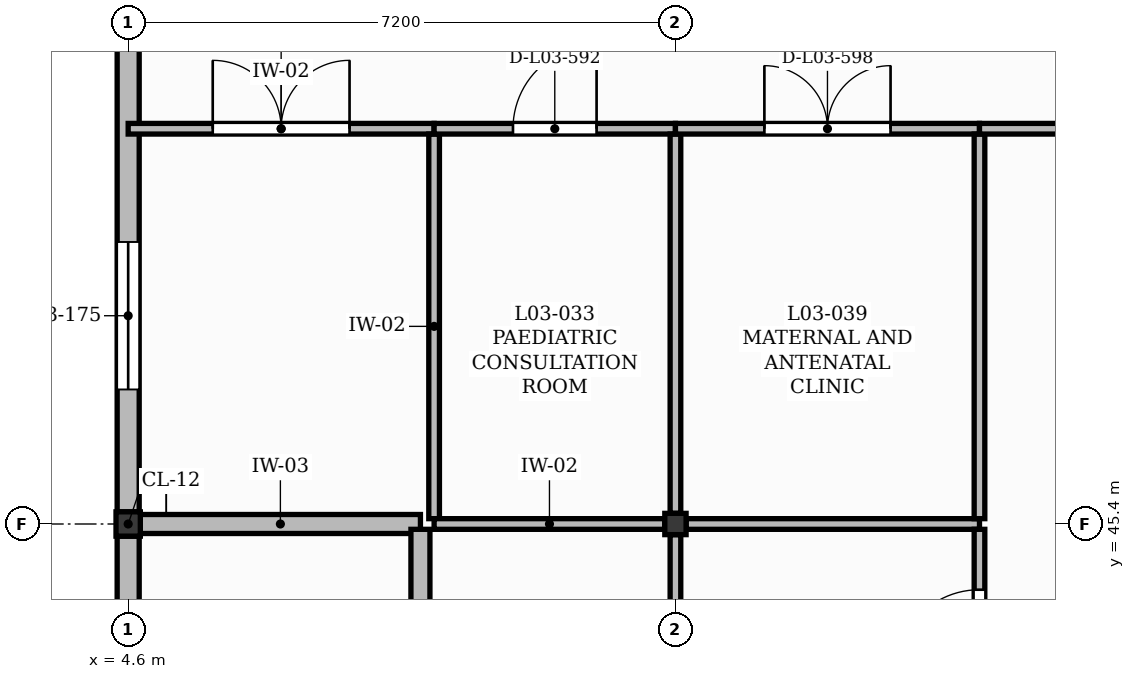
"""IFC4 building model, lengths in metres.
Left out: names, types, materials, properties, quantities, classifications, styles, units other than length and angle.
Written with IfcOpenShell. Run it as: python <this file> out.ifc"""

import sys

from ifc_helpers import new_model, si_unit, direction, frame, frame_2d, origin, origin_2d, place, context, subcontext, project, spatial, rectangle, extrude, element, fill, save


model = new_model("IFC4")
c1 = context("Model", 3, precision=1e-05, world=origin(), true_north=direction((0.0, 1.0)))
c2 = subcontext(c1, "Body", "Model", "MODEL_VIEW")
j1 = project(units=[si_unit("LENGTHUNIT", "METRE"), si_unit("PLANEANGLEUNIT", "RADIAN")], contexts=[c1])
p1 = place(None, origin())
s1 = spatial("IfcSite", under=j1, at=p1, CompositionType="ELEMENT")
p2 = place(p1, origin())
s2 = spatial("IfcBuilding", under=s1, at=p2, CompositionType="ELEMENT")
p3 = place(p2, frame((0.0, 0.0, 13.2)))
s3 = spatial("IfcBuildingStorey", under=s2, at=p3, CompositionType="ELEMENT", Elevation=13.2)
p4 = place(p3, frame((4.6, 45.4, 0.0), z_axis=(0.0, 0.0, 1.0), x_axis=(1.0, 0.0, 0.0)))
e1 = element("IfcColumn", 1, at=p4, inside=s3, PredefinedType="COLUMN", context=c2, shape_type="SweptSolid", body=[
    extrude(rectangle(XDim=0.32, YDim=0.32, at=origin_2d()), origin(), (0.0, 0.0, 1.0), 3.98),
])
p5 = place(p3, frame((11.8, 45.4, 0.0), z_axis=(0.0, 0.0, 1.0), x_axis=(1.0, 0.0, 0.0)))
e2 = element("IfcColumn", 2, at=p5, inside=s3, PredefinedType="COLUMN", context=c2, shape_type="SweptSolid", body=[
    extrude(rectangle(XDim=0.28, YDim=0.28, at=origin_2d()), origin(), (0.0, 0.0, 1.0), 3.98),
])
p6 = place(p3, frame((4.6, 36.94, 0.0), z_axis=(0.0, 0.0, 1.0), x_axis=(0.0, 1.0, 0.0)))
e3 = element("IfcWall", 3, at=p6, inside=s3, PredefinedType="SOLIDWALL", context=c2, shape_type="SweptSolid", body=[
    extrude(rectangle(XDim=8.3, YDim=0.29, at=frame_2d((4.15, 0.0))), origin(), (0.0, 0.0, 1.0), 3.49),
])
p7 = place(p6, frame((2.845, 0.0, 1.0)))
e4 = element("IfcOpeningElement", 4, at=p7, cuts=e3, PredefinedType="OPENING", context=c2, shape_type="SweptSolid", body=[
    extrude(rectangle(XDim=1.66, YDim=1.8, at=frame_2d((0.83, 0.9))), frame((0.0, 0.155, 0.0), z_axis=(0.0, -1.0, 0.0), x_axis=(1.0, 0.0, 0.0)), (0.0, 0.0, 1.0), 0.31),
])
p8 = place(p6, frame((5.185, 0.0, 1.0)))
e5 = element("IfcOpeningElement", 5, at=p8, cuts=e3, PredefinedType="OPENING", context=c2, shape_type="SweptSolid", body=[
    extrude(rectangle(XDim=1.66, YDim=1.8, at=frame_2d((0.83, 0.9))), frame((0.0, 0.155, 0.0), z_axis=(0.0, -1.0, 0.0), x_axis=(1.0, 0.0, 0.0)), (0.0, 0.0, 1.0), 0.31),
])
p9 = place(p3, frame((4.6, 45.56, 0.0), z_axis=(0.0, 0.0, 1.0), x_axis=(0.0, 1.0, 0.0)))
e6 = element("IfcWall", 6, at=p9, inside=s3, PredefinedType="SOLIDWALL", context=c2, shape_type="SweptSolid", body=[
    extrude(rectangle(XDim=6.9, YDim=0.29, at=frame_2d((3.45, 0.0))), origin(), (0.0, 0.0, 1.0), 3.52),
])
p10 = place(p9, frame((1.61, 0.0, 1.0)))
e7 = element("IfcOpeningElement", 7, at=p10, cuts=e6, PredefinedType="OPENING", context=c2, shape_type="SweptSolid", body=[
    extrude(rectangle(XDim=1.94, YDim=1.8, at=frame_2d((0.97, 0.9))), frame((0.0, 0.155, 0.0), z_axis=(0.0, -1.0, 0.0), x_axis=(1.0, 0.0, 0.0)), (0.0, 0.0, 1.0), 0.31),
])
p11 = place(p3, frame((4.76, 45.4, 0.0), z_axis=(0.0, 0.0, 1.0), x_axis=(1.0, 0.0, 0.0)))
e8 = element("IfcWall", 8, at=p11, inside=s3, PredefinedType="SOLIDWALL", context=c2, shape_type="SweptSolid", body=[
    extrude(rectangle(XDim=3.685, YDim=0.25, at=frame_2d((1.843, 0.0))), origin(), (0.0, 0.0, 1.0), 3.52),
])
p12 = place(p3, frame((4.6, 50.6, 0.0), z_axis=(0.0, 0.0, 1.0), x_axis=(1.0, 0.0, 0.0)))
e9 = element("IfcWall", 9, at=p12, inside=s3, PredefinedType="PARTITIONING", context=c2, shape_type="SweptSolid", body=[
    extrude(rectangle(XDim=4.025, YDim=0.14, at=frame_2d((2.012, 0.0))), origin(), (0.0, 0.0, 1.0), 3.93),
])
p13 = place(p12, frame((1.113, 0.0, 0.0)))
e10 = element("IfcOpeningElement", 10, at=p13, cuts=e9, PredefinedType="OPENING", context=c2, shape_type="SweptSolid", body=[
    extrude(rectangle(XDim=1.8, YDim=2.3, at=frame_2d((0.9, 1.15))), frame((0.0, 0.08, 0.0), z_axis=(0.0, -1.0, 0.0), x_axis=(1.0, 0.0, 0.0)), (0.0, 0.0, 1.0), 0.16),
])
p14 = place(p3, frame((8.445, 38.52, 0.0), z_axis=(0.0, 0.0, 1.0), x_axis=(0.0, 1.0, 0.0)))
e11 = element("IfcWall", 11, at=p14, inside=s3, PredefinedType="SOLIDWALL", context=c2, shape_type="SweptSolid", body=[
    extrude(rectangle(XDim=6.81, YDim=0.25, at=frame_2d((3.405, 0.0))), origin(), (0.0, 0.0, 1.0), 3.93),
])
p15 = place(p3, frame((8.625, 45.47, 0.0), z_axis=(0.0, 0.0, 1.0), x_axis=(0.0, 1.0, 0.0)))
e12 = element("IfcWall", 12, at=p15, inside=s3, PredefinedType="PARTITIONING", context=c2, shape_type="SweptSolid", body=[
    extrude(rectangle(XDim=5.06, YDim=0.14, at=frame_2d((2.53, 0.0))), origin(), (0.0, 0.0, 1.0), 3.93),
])
p16 = place(p3, frame((8.625, 45.4, 0.0), z_axis=(0.0, 0.0, 1.0), x_axis=(1.0, 0.0, 0.0)))
e13 = element("IfcWall", 13, at=p16, inside=s3, PredefinedType="PARTITIONING", context=c2, shape_type="SweptSolid", body=[
    extrude(rectangle(XDim=3.035, YDim=0.14, at=frame_2d((1.518, 0.0))), origin(), (0.0, 0.0, 1.0), 3.52),
])
p17 = place(p3, frame((8.625, 50.6, 0.0), z_axis=(0.0, 0.0, 1.0), x_axis=(1.0, 0.0, 0.0)))
e14 = element("IfcWall", 14, at=p17, inside=s3, PredefinedType="PARTITIONING", context=c2, shape_type="SweptSolid", body=[
    extrude(rectangle(XDim=3.175, YDim=0.14, at=frame_2d((1.587, 0.0))), origin(), (0.0, 0.0, 1.0), 3.93),
])
p18 = place(p17, frame((1.038, 0.0, 0.0)))
e15 = element("IfcOpeningElement", 15, at=p18, cuts=e14, PredefinedType="OPENING", context=c2, shape_type="SweptSolid", body=[
    extrude(rectangle(XDim=1.1, YDim=2.1, at=frame_2d((0.55, 1.05))), frame((0.0, 0.08, 0.0), z_axis=(0.0, -1.0, 0.0), x_axis=(1.0, 0.0, 0.0)), (0.0, 0.0, 1.0), 0.16),
])
p19 = place(p3, frame((11.8, 42.641, 0.0), z_axis=(0.0, 0.0, 1.0), x_axis=(0.0, 1.0, 0.0)))
e16 = element("IfcWall", 16, at=p19, inside=s3, PredefinedType="PARTITIONING", context=c2, shape_type="SweptSolid", body=[
    extrude(rectangle(XDim=2.619, YDim=0.14, at=frame_2d((1.31, 0.0))), origin(), (0.0, 0.0, 1.0), 3.49),
])
p20 = place(p3, frame((11.8, 45.54, 0.0), z_axis=(0.0, 0.0, 1.0), x_axis=(0.0, 1.0, 0.0)))
e17 = element("IfcWall", 17, at=p20, inside=s3, PredefinedType="PARTITIONING", context=c2, shape_type="SweptSolid", body=[
    extrude(rectangle(XDim=4.99, YDim=0.14, at=frame_2d((2.495, 0.0))), origin(), (0.0, 0.0, 1.0), 3.46),
])
p21 = place(p3, frame((11.94, 45.4, 0.0), z_axis=(0.0, 0.0, 1.0), x_axis=(1.0, 0.0, 0.0)))
e18 = element("IfcWall", 18, at=p21, inside=s3, PredefinedType="PARTITIONING", context=c2, shape_type="SweptSolid", body=[
    extrude(rectangle(XDim=3.86, YDim=0.14, at=frame_2d((1.93, 0.0))), origin(), (0.0, 0.0, 1.0), 3.52),
])
p22 = place(p3, frame((11.8, 50.6, 0.0), z_axis=(0.0, 0.0, 1.0), x_axis=(1.0, 0.0, 0.0)))
e19 = element("IfcWall", 19, at=p22, inside=s3, PredefinedType="PARTITIONING", context=c2, shape_type="SweptSolid", body=[
    extrude(rectangle(XDim=4.0, YDim=0.14, at=frame_2d((2.0, 0.0))), origin(), (0.0, 0.0, 1.0), 3.93),
])
p23 = place(p22, frame((1.17, 0.0, 0.0)))
e20 = element("IfcOpeningElement", 20, at=p23, cuts=e19, PredefinedType="OPENING", context=c2, shape_type="SweptSolid", body=[
    extrude(rectangle(XDim=1.66, YDim=2.3, at=frame_2d((0.83, 1.15))), frame((0.0, 0.08, 0.0), z_axis=(0.0, -1.0, 0.0), x_axis=(1.0, 0.0, 0.0)), (0.0, 0.0, 1.0), 0.16),
])
p24 = place(p3, frame((15.8, 42.641, 0.0), z_axis=(0.0, 0.0, 1.0), x_axis=(0.0, 1.0, 0.0)))
e21 = element("IfcWall", 21, at=p24, inside=s3, PredefinedType="PARTITIONING", context=c2, shape_type="SweptSolid", body=[
    extrude(rectangle(XDim=2.689, YDim=0.14, at=frame_2d((1.344, 0.0))), origin(), (0.0, 0.0, 1.0), 3.93),
])
p25 = place(p24, frame((0.794, 0.0, 0.0)))
e22 = element("IfcOpeningElement", 22, at=p25, cuts=e21, PredefinedType="OPENING", context=c2, shape_type="SweptSolid", body=[
    extrude(rectangle(XDim=1.1, YDim=2.1, at=frame_2d((0.55, 1.05))), frame((0.0, 0.08, 0.0), z_axis=(0.0, -1.0, 0.0), x_axis=(1.0, 0.0, 0.0)), (0.0, 0.0, 1.0), 0.16),
])
p26 = place(p3, frame((15.8, 45.47, 0.0), z_axis=(0.0, 0.0, 1.0), x_axis=(0.0, 1.0, 0.0)))
e23 = element("IfcWall", 23, at=p26, inside=s3, PredefinedType="PARTITIONING", context=c2, shape_type="SweptSolid", body=[
    extrude(rectangle(XDim=5.06, YDim=0.14, at=frame_2d((2.53, 0.0))), origin(), (0.0, 0.0, 1.0), 3.93),
])
p27 = place(p3, frame((15.8, 50.6, 0.0), z_axis=(0.0, 0.0, 1.0), x_axis=(1.0, 0.0, 0.0)))
e24 = element("IfcWall", 24, at=p27, inside=s3, PredefinedType="PARTITIONING", context=c2, shape_type="SweptSolid", body=[
    extrude(rectangle(XDim=3.2, YDim=0.14, at=frame_2d((1.6, 0.0))), origin(), (0.0, 0.0, 1.0), 3.93),
])
p28 = place(p27, frame((1.08, 0.0, 0.0)))
e25 = element("IfcOpeningElement", 25, at=p28, cuts=e24, PredefinedType="OPENING", context=c2, shape_type="SweptSolid", body=[
    extrude(rectangle(XDim=1.04, YDim=2.1, at=frame_2d((0.52, 1.05))), frame((0.0, 0.08, 0.0), z_axis=(0.0, -1.0, 0.0), x_axis=(1.0, 0.0, 0.0)), (0.0, 0.0, 1.0), 0.16),
])
p29 = place(p10, origin())
e26 = element("IfcWindow", 26, at=p29, inside=s3, PartitioningType="DOUBLE_PANEL_VERTICAL", PredefinedType="WINDOW", context=c2, shape_type="SweptSolid", body=[
    extrude(rectangle(XDim=1.94, YDim=1.8, at=frame_2d((0.97, 0.9))), frame((0.0, 0.03, 0.0), z_axis=(0.0, -1.0, 0.0), x_axis=(1.0, 0.0, 0.0)), (0.0, 0.0, 1.0), 0.06),
])
fill(e7, e26)
p30 = place(p13, origin())
e27 = element("IfcDoor", 27, at=p30, inside=s3, OperationType="DOUBLE_DOOR_SINGLE_SWING", PredefinedType="DOOR", context=c2, shape_type="SweptSolid", body=[
    extrude(rectangle(XDim=1.8, YDim=2.3, at=frame_2d((0.9, 1.15))), frame((0.0, 0.025, 0.0), z_axis=(0.0, -1.0, 0.0), x_axis=(1.0, 0.0, 0.0)), (0.0, 0.0, 1.0), 0.05),
])
fill(e10, e27)
p31 = place(p18, origin())
e28 = element("IfcDoor", 28, at=p31, inside=s3, OperationType="SINGLE_SWING_RIGHT", PredefinedType="DOOR", context=c2, shape_type="SweptSolid", body=[
    extrude(rectangle(XDim=1.1, YDim=2.1, at=frame_2d((0.55, 1.05))), frame((0.0, 0.025, 0.0), z_axis=(0.0, -1.0, 0.0), x_axis=(1.0, 0.0, 0.0)), (0.0, 0.0, 1.0), 0.05),
])
fill(e15, e28)
p32 = place(p25, origin())
e29 = element("IfcDoor", 29, at=p32, inside=s3, OperationType="SINGLE_SWING_LEFT", PredefinedType="DOOR", context=c2, shape_type="SweptSolid", body=[
    extrude(rectangle(XDim=1.1, YDim=2.1, at=frame_2d((0.55, 1.05))), frame((0.0, 0.025, 0.0), z_axis=(0.0, -1.0, 0.0), x_axis=(1.0, 0.0, 0.0)), (0.0, 0.0, 1.0), 0.05),
])
fill(e22, e29)
p33 = place(p23, origin())
e30 = element("IfcDoor", 30, at=p33, inside=s3, OperationType="DOUBLE_DOOR_SINGLE_SWING", PredefinedType="DOOR", context=c2, shape_type="SweptSolid", body=[
    extrude(rectangle(XDim=1.66, YDim=2.3, at=frame_2d((0.83, 1.15))), frame((0.0, 0.025, 0.0), z_axis=(0.0, -1.0, 0.0), x_axis=(1.0, 0.0, 0.0)), (0.0, 0.0, 1.0), 0.05),
])
fill(e20, e30)
save(model, sys.argv[1])
